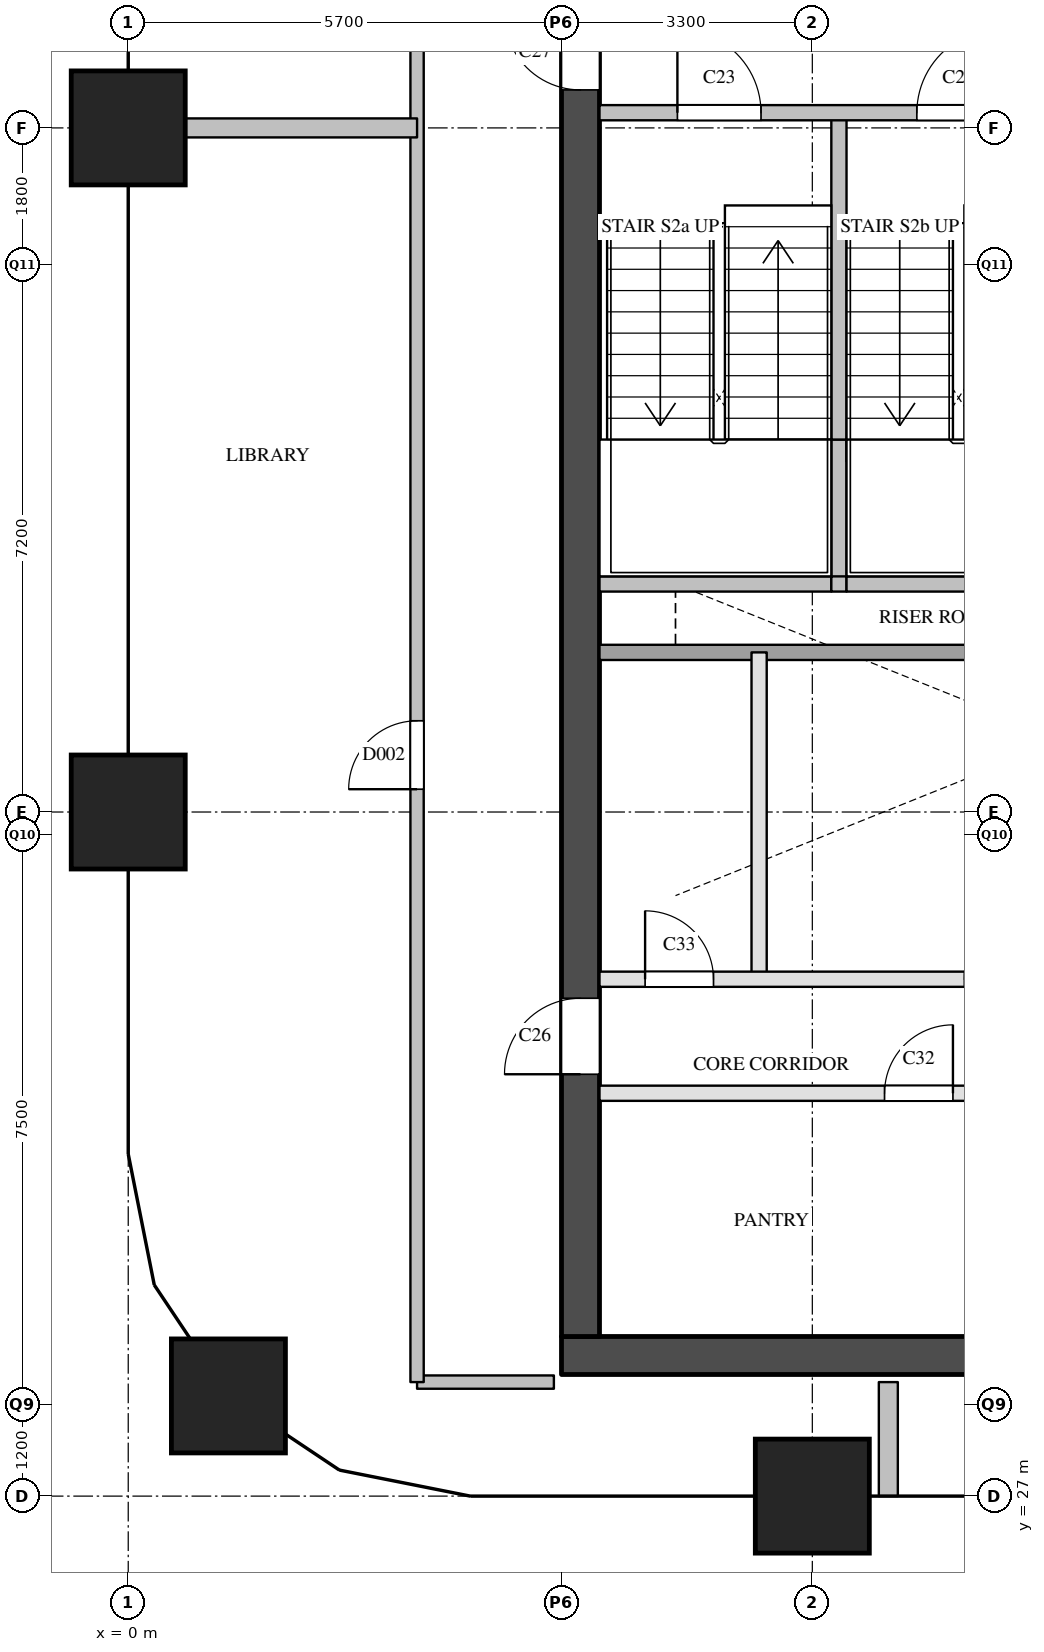
"""IFC4 building model, lengths in metres.
Left out: names, types, materials, properties, quantities, classifications, styles, units other than length and angle.
Written with IfcOpenShell. Run it as: python <this file> out.ifc"""

import sys

from ifc_helpers import new_model, si_unit, direction, frame, frame_2d, origin, origin_2d, place, context, subcontext, project, spatial, rectangle, extrude, element, fill, save


model = new_model("IFC4")
c1 = context("Model", 3, precision=1e-05, world=origin(), true_north=direction((0.0, 1.0)))
c2 = subcontext(c1, "Body", "Model", "MODEL_VIEW")
j1 = project(units=[si_unit("LENGTHUNIT", "METRE"), si_unit("PLANEANGLEUNIT", "RADIAN")], contexts=[c1])
p1 = place(None, origin())
s1 = spatial("IfcSite", under=j1, at=p1, CompositionType="ELEMENT")
p2 = place(p1, origin())
s2 = spatial("IfcBuilding", under=s1, at=p2, CompositionType="ELEMENT")
p3 = place(p2, frame((0.0, 0.0, 170.0)))
s3 = spatial("IfcBuildingStorey", under=s2, at=p3, CompositionType="ELEMENT", Elevation=170.0)
for number, where, z_axis, x_axis in (
    (1, (1.318, 28.318, 0.0), (0.0, 0.0, 1.0), (1.0, 0.0, 0.0)),
    (2, (0.0, 36.0, 0.0), (0.0, 0.0, 1.0), (1.0, 0.0, 0.0)),
    (3, (0.0, 45.0, 0.0), (0.0, 0.0, 1.0), (1.0, 0.0, 0.0)),
    (4, (9.0, 27.0, 0.0), (0.0, 0.0, 1.0), (1.0, 0.0, 0.0)),
):
    element("IfcColumn", number, at=place(p3, frame(where, z_axis=z_axis, x_axis=x_axis)), inside=s3, PredefinedType="COLUMN", context=c2, shape_type="SweptSolid", body=[
        extrude(rectangle(XDim=1.5, YDim=1.5, at=origin_2d()), origin(), (0.0, 0.0, 1.0), 3.9),
    ])
p4 = place(p3, frame((5.7, 28.85, 0.0), z_axis=(0.0, 0.0, 1.0), x_axis=(1.0, 0.0, 0.0)))
e5 = element("IfcWall", 5, at=p4, inside=s3, PredefinedType="SHEAR", context=c2, shape_type="SweptSolid", body=[
    extrude(rectangle(XDim=12.2, YDim=0.5, at=frame_2d((6.1, 0.0))), origin(), (0.0, 0.0, 1.0), 3.6),
])
p5 = place(p4, frame((9.35, 0.0, 0.0)))
e6 = element("IfcOpeningElement", 6, at=p5, cuts=e5, PredefinedType="OPENING", context=c2, shape_type="SweptSolid", body=[
    extrude(rectangle(XDim=1.2, YDim=2.1, at=frame_2d((0.6, 1.05))), frame((0.0, 0.26, 0.0), z_axis=(0.0, -1.0, 0.0), x_axis=(1.0, 0.0, 0.0)), (0.0, 0.0, 1.0), 0.52),
])
p6 = place(p3, frame((5.95, 29.1, 0.0), z_axis=(0.0, 0.0, 1.0), x_axis=(0.0, 1.0, 0.0)))
e7 = element("IfcWall", 7, at=p6, inside=s3, PredefinedType="SHEAR", context=c2, shape_type="SweptSolid", body=[
    extrude(rectangle(XDim=20.3, YDim=0.5, at=frame_2d((10.15, 0.0))), origin(), (0.0, 0.0, 1.0), 3.6),
])
p7 = place(p6, frame((3.45, 0.0, 0.0)))
e8 = element("IfcOpeningElement", 8, at=p7, cuts=e7, PredefinedType="OPENING", context=c2, shape_type="SweptSolid", body=[
    extrude(rectangle(XDim=1.0, YDim=2.1, at=frame_2d((0.5, 1.05))), frame((0.0, 0.26, 0.0), z_axis=(0.0, -1.0, 0.0), x_axis=(1.0, 0.0, 0.0)), (0.0, 0.0, 1.0), 0.52),
])
p8 = place(p6, frame((16.4, 0.0, 0.0)))
e9 = element("IfcOpeningElement", 9, at=p8, cuts=e7, PredefinedType="OPENING", context=c2, shape_type="SweptSolid", body=[
    extrude(rectangle(XDim=1.0, YDim=2.1, at=frame_2d((0.5, 1.05))), frame((0.0, 0.26, 0.0), z_axis=(0.0, -1.0, 0.0), x_axis=(1.0, 0.0, 0.0)), (0.0, 0.0, 1.0), 0.52),
])
p9 = place(p3, frame((8.3, 33.8, 0.0), z_axis=(0.0, 0.0, 1.0), x_axis=(0.0, 1.0, 0.0)))
e10 = element("IfcWall", 10, at=p9, inside=s3, PredefinedType="PARTITIONING", context=c2, shape_type="SweptSolid", body=[
    extrude(rectangle(XDim=4.3, YDim=0.2, at=frame_2d((2.15, 0.0))), origin(), (0.0, 0.0, 1.0), 3.6),
])
p10 = place(p3, frame((9.35, 39.0, 0.0), z_axis=(0.0, 0.0, 1.0), x_axis=(0.0, 1.0, 0.0)))
e11 = element("IfcWall", 11, at=p10, inside=s3, PredefinedType="SOLIDWALL", context=c2, shape_type="SweptSolid", body=[
    extrude(rectangle(XDim=1.9, YDim=0.2, at=frame_2d((0.95, 0.0))), origin(), (0.0, 0.0, 1.0), 3.6),
])
p11 = place(p3, frame((9.35, 40.9, 0.0), z_axis=(0.0, 0.0, 1.0), x_axis=(0.0, 1.0, 0.0)))
e12 = element("IfcWall", 12, at=p11, inside=s3, PredefinedType="SOLIDWALL", context=c2, shape_type="SweptSolid", body=[
    extrude(rectangle(XDim=4.3, YDim=0.2, at=frame_2d((2.15, 0.0))), origin(), (0.0, 0.0, 1.0), 3.6),
])
p12 = place(p3, frame((6.2, 32.3, 0.0), z_axis=(0.0, 0.0, 1.0), x_axis=(1.0, 0.0, 0.0)))
e13 = element("IfcWall", 13, at=p12, inside=s3, PredefinedType="PARTITIONING", context=c2, shape_type="SweptSolid", body=[
    extrude(rectangle(XDim=8.4, YDim=0.2, at=frame_2d((4.2, 0.0))), origin(), (0.0, 0.0, 1.0), 3.6),
])
p13 = place(p12, frame((3.75, 0.0, 0.0)))
e14 = element("IfcOpeningElement", 14, at=p13, cuts=e13, PredefinedType="OPENING", context=c2, shape_type="SweptSolid", body=[
    extrude(rectangle(XDim=0.9, YDim=2.1, at=frame_2d((0.45, 1.05))), frame((0.0, 0.11, 0.0), z_axis=(0.0, -1.0, 0.0), x_axis=(1.0, 0.0, 0.0)), (0.0, 0.0, 1.0), 0.22),
])
p14 = place(p3, frame((6.2, 33.8, 0.0), z_axis=(0.0, 0.0, 1.0), x_axis=(1.0, 0.0, 0.0)))
e15 = element("IfcWall", 15, at=p14, inside=s3, PredefinedType="PARTITIONING", context=c2, shape_type="SweptSolid", body=[
    extrude(rectangle(XDim=8.4, YDim=0.2, at=frame_2d((4.2, 0.0))), origin(), (0.0, 0.0, 1.0), 3.6),
])
p15 = place(p14, frame((0.6, 0.0, 0.0)))
e16 = element("IfcOpeningElement", 16, at=p15, cuts=e15, PredefinedType="OPENING", context=c2, shape_type="SweptSolid", body=[
    extrude(rectangle(XDim=0.9, YDim=2.1, at=frame_2d((0.45, 1.05))), frame((0.0, 0.11, 0.0), z_axis=(0.0, -1.0, 0.0), x_axis=(1.0, 0.0, 0.0)), (0.0, 0.0, 1.0), 0.22),
])
p16 = place(p14, frame((4.8, 0.0, 0.0)))
e17 = element("IfcOpeningElement", 17, at=p16, cuts=e15, PredefinedType="OPENING", context=c2, shape_type="SweptSolid", body=[
    extrude(rectangle(XDim=0.9, YDim=2.1, at=frame_2d((0.45, 1.05))), frame((0.0, 0.11, 0.0), z_axis=(0.0, -1.0, 0.0), x_axis=(1.0, 0.0, 0.0)), (0.0, 0.0, 1.0), 0.22),
])
p17 = place(p3, frame((6.2, 38.1, 0.0), z_axis=(0.0, 0.0, 1.0), x_axis=(1.0, 0.0, 0.0)))
e18 = element("IfcWall", 18, at=p17, inside=s3, PredefinedType="SOLIDWALL", context=c2, shape_type="SweptSolid", body=[
    extrude(rectangle(XDim=11.2, YDim=0.2, at=frame_2d((5.6, 0.0))), origin(), (0.0, 0.0, 1.0), 3.6),
])
p18 = place(p17, frame((8.85, 0.0, 0.0)))
e19 = element("IfcOpeningElement", 19, at=p18, cuts=e18, PredefinedType="OPENING", context=c2, shape_type="SweptSolid", body=[
    extrude(rectangle(XDim=1.2, YDim=2.1, at=frame_2d((0.6, 1.05))), frame((0.0, 0.11, 0.0), z_axis=(0.0, -1.0, 0.0), x_axis=(1.0, 0.0, 0.0)), (0.0, 0.0, 1.0), 0.22),
])
p19 = place(p3, frame((6.2, 39.0, 0.0), z_axis=(0.0, 0.0, 1.0), x_axis=(1.0, 0.0, 0.0)))
e20 = element("IfcWall", 20, at=p19, inside=s3, PredefinedType="SOLIDWALL", context=c2, shape_type="SweptSolid", body=[
    extrude(rectangle(XDim=3.05, YDim=0.2, at=frame_2d((1.525, 0.0))), origin(), (0.0, 0.0, 1.0), 3.6),
])
p20 = place(p3, frame((9.25, 39.0, 0.0), z_axis=(0.0, 0.0, 1.0), x_axis=(1.0, 0.0, 0.0)))
e21 = element("IfcWall", 21, at=p20, inside=s3, PredefinedType="SOLIDWALL", context=c2, shape_type="SweptSolid", body=[
    extrude(rectangle(XDim=0.2, YDim=0.2, at=frame_2d((0.1, 0.0))), origin(), (0.0, 0.0, 1.0), 3.6),
])
p21 = place(p3, frame((9.45, 39.0, 0.0), z_axis=(0.0, 0.0, 1.0), x_axis=(1.0, 0.0, 0.0)))
e22 = element("IfcWall", 22, at=p21, inside=s3, PredefinedType="SOLIDWALL", context=c2, shape_type="SweptSolid", body=[
    extrude(rectangle(XDim=3.05, YDim=0.2, at=frame_2d((1.525, 0.0))), origin(), (0.0, 0.0, 1.0), 3.6),
])
p22 = place(p3, frame((6.2, 45.2, 0.0), z_axis=(0.0, 0.0, 1.0), x_axis=(1.0, 0.0, 0.0)))
e23 = element("IfcWall", 23, at=p22, inside=s3, PredefinedType="SOLIDWALL", context=c2, shape_type="SweptSolid", body=[
    extrude(rectangle(XDim=6.3, YDim=0.2, at=frame_2d((3.15, 0.0))), origin(), (0.0, 0.0, 1.0), 3.6),
])
p23 = place(p22, frame((1.025, 0.0, 0.0)))
e24 = element("IfcOpeningElement", 24, at=p23, cuts=e23, PredefinedType="OPENING", context=c2, shape_type="SweptSolid", body=[
    extrude(rectangle(XDim=1.1, YDim=2.1, at=frame_2d((0.55, 1.05))), frame((0.0, 0.11, 0.0), z_axis=(0.0, -1.0, 0.0), x_axis=(1.0, 0.0, 0.0)), (0.0, 0.0, 1.0), 0.22),
])
p24 = place(p22, frame((4.175, 0.0, 0.0)))
e25 = element("IfcOpeningElement", 25, at=p24, cuts=e23, PredefinedType="OPENING", context=c2, shape_type="SweptSolid", body=[
    extrude(rectangle(XDim=1.1, YDim=2.1, at=frame_2d((0.55, 1.05))), frame((0.0, 0.11, 0.0), z_axis=(0.0, -1.0, 0.0), x_axis=(1.0, 0.0, 0.0)), (0.0, 0.0, 1.0), 0.22),
])
p25 = place(p3, frame((3.8, 28.5, 0.0), z_axis=(0.0, 0.0, 1.0), x_axis=(1.0, 0.0, 0.0)))
e26 = element("IfcWall", 26, at=p25, inside=s3, PredefinedType="PARTITIONING", context=c2, shape_type="SweptSolid", body=[
    extrude(rectangle(XDim=1.8, YDim=0.175, at=frame_2d((0.9, 0.0))), origin(), (0.0, 0.0, 1.0), 3.6),
])
p26 = place(p3, frame((3.8, 28.5, 0.0), z_axis=(0.0, 0.0, 1.0), x_axis=(0.0, 1.0, 0.0)))
e27 = element("IfcWall", 27, at=p26, inside=s3, PredefinedType="PARTITIONING", context=c2, shape_type="SweptSolid", body=[
    extrude(rectangle(XDim=23.3, YDim=0.175, at=frame_2d((11.65, 0.0))), origin(), (0.0, 0.0, 1.0), 3.6),
])
p27 = place(p26, frame((7.8, 0.0, 0.0)))
e28 = element("IfcOpeningElement", 28, at=p27, cuts=e27, PredefinedType="OPENING", context=c2, shape_type="SweptSolid", body=[
    extrude(rectangle(XDim=0.9, YDim=2.1, at=frame_2d((0.45, 1.05))), frame((0.0, 0.097, 0.0), z_axis=(0.0, -1.0, 0.0), x_axis=(1.0, 0.0, 0.0)), (0.0, 0.0, 1.0), 0.195),
])
p28 = place(p26, frame((19.45, 0.0, 0.0)))
e29 = element("IfcOpeningElement", 29, at=p28, cuts=e27, PredefinedType="OPENING", context=c2, shape_type="SweptSolid", body=[
    extrude(rectangle(XDim=0.9, YDim=2.1, at=frame_2d((0.45, 1.05))), frame((0.0, 0.097, 0.0), z_axis=(0.0, -1.0, 0.0), x_axis=(1.0, 0.0, 0.0)), (0.0, 0.0, 1.0), 0.195),
])
p29 = place(p3, frame((0.0, 45.0, 0.0), z_axis=(0.0, 0.0, 1.0), x_axis=(1.0, 0.0, 0.0)))
e30 = element("IfcWall", 30, at=p29, inside=s3, PredefinedType="PARTITIONING", context=c2, shape_type="SweptSolid", body=[
    extrude(rectangle(XDim=3.8, YDim=0.25, at=frame_2d((1.9, 0.0))), origin(), (0.0, 0.0, 1.0), 3.6),
])
p30 = place(p3, frame((10.0, 27.0, 0.0), z_axis=(0.0, 0.0, 1.0), x_axis=(0.0, 1.0, 0.0)))
e31 = element("IfcWall", 31, at=p30, inside=s3, PredefinedType="PARTITIONING", context=c2, shape_type="SweptSolid", body=[
    extrude(rectangle(XDim=1.5, YDim=0.25, at=frame_2d((0.75, 0.0))), origin(), (0.0, 0.0, 1.0), 2.6),
])
p31 = place(p23, origin())
e32 = element("IfcDoor", 32, at=p31, inside=s3, OperationType="SINGLE_SWING_LEFT", PredefinedType="DOOR", context=c2, shape_type="SweptSolid", body=[
    extrude(rectangle(XDim=1.1, YDim=2.1, at=frame_2d((0.55, 1.05))), frame((0.0, 0.025, 0.0), z_axis=(0.0, -1.0, 0.0), x_axis=(1.0, 0.0, 0.0)), (0.0, 0.0, 1.0), 0.05),
])
fill(e24, e32)
p32 = place(p24, origin())
e33 = element("IfcDoor", 33, at=p32, inside=s3, OperationType="SINGLE_SWING_RIGHT", PredefinedType="DOOR", context=c2, shape_type="SweptSolid", body=[
    extrude(rectangle(XDim=1.1, YDim=2.1, at=frame_2d((0.55, 1.05))), frame((0.0, 0.025, 0.0), z_axis=(0.0, -1.0, 0.0), x_axis=(1.0, 0.0, 0.0)), (0.0, 0.0, 1.0), 0.05),
])
fill(e25, e33)
p33 = place(p7, origin())
e34 = element("IfcDoor", 34, at=p33, inside=s3, OperationType="SINGLE_SWING_LEFT", PredefinedType="DOOR", context=c2, shape_type="SweptSolid", body=[
    extrude(rectangle(XDim=1.0, YDim=2.1, at=frame_2d((0.5, 1.05))), frame((0.0, 0.025, 0.0), z_axis=(0.0, -1.0, 0.0), x_axis=(1.0, 0.0, 0.0)), (0.0, 0.0, 1.0), 0.05),
])
fill(e8, e34)
p34 = place(p8, origin())
e35 = element("IfcDoor", 35, at=p34, inside=s3, OperationType="SINGLE_SWING_RIGHT", PredefinedType="DOOR", context=c2, shape_type="SweptSolid", body=[
    extrude(rectangle(XDim=1.0, YDim=2.1, at=frame_2d((0.5, 1.05))), frame((0.0, 0.025, 0.0), z_axis=(0.0, -1.0, 0.0), x_axis=(1.0, 0.0, 0.0)), (0.0, 0.0, 1.0), 0.05),
])
fill(e9, e35)
p35 = place(p13, origin())
e36 = element("IfcDoor", 36, at=p35, inside=s3, OperationType="SINGLE_SWING_RIGHT", PredefinedType="DOOR", context=c2, shape_type="SweptSolid", body=[
    extrude(rectangle(XDim=0.9, YDim=2.1, at=frame_2d((0.45, 1.05))), frame((0.0, 0.025, 0.0), z_axis=(0.0, -1.0, 0.0), x_axis=(1.0, 0.0, 0.0)), (0.0, 0.0, 1.0), 0.05),
])
fill(e14, e36)
p36 = place(p15, origin())
e37 = element("IfcDoor", 37, at=p36, inside=s3, OperationType="SINGLE_SWING_LEFT", PredefinedType="DOOR", context=c2, shape_type="SweptSolid", body=[
    extrude(rectangle(XDim=0.9, YDim=2.1, at=frame_2d((0.45, 1.05))), frame((0.0, 0.025, 0.0), z_axis=(0.0, -1.0, 0.0), x_axis=(1.0, 0.0, 0.0)), (0.0, 0.0, 1.0), 0.05),
])
fill(e16, e37)
p37 = place(p27, origin())
e38 = element("IfcDoor", 38, at=p37, inside=s3, OperationType="SINGLE_SWING_LEFT", PredefinedType="DOOR", context=c2, shape_type="SweptSolid", body=[
    extrude(rectangle(XDim=0.9, YDim=2.1, at=frame_2d((0.45, 1.05))), frame((0.0, 0.025, 0.0), z_axis=(0.0, -1.0, 0.0), x_axis=(1.0, 0.0, 0.0)), (0.0, 0.0, 1.0), 0.05),
])
fill(e28, e38)
save(model, sys.argv[1])
